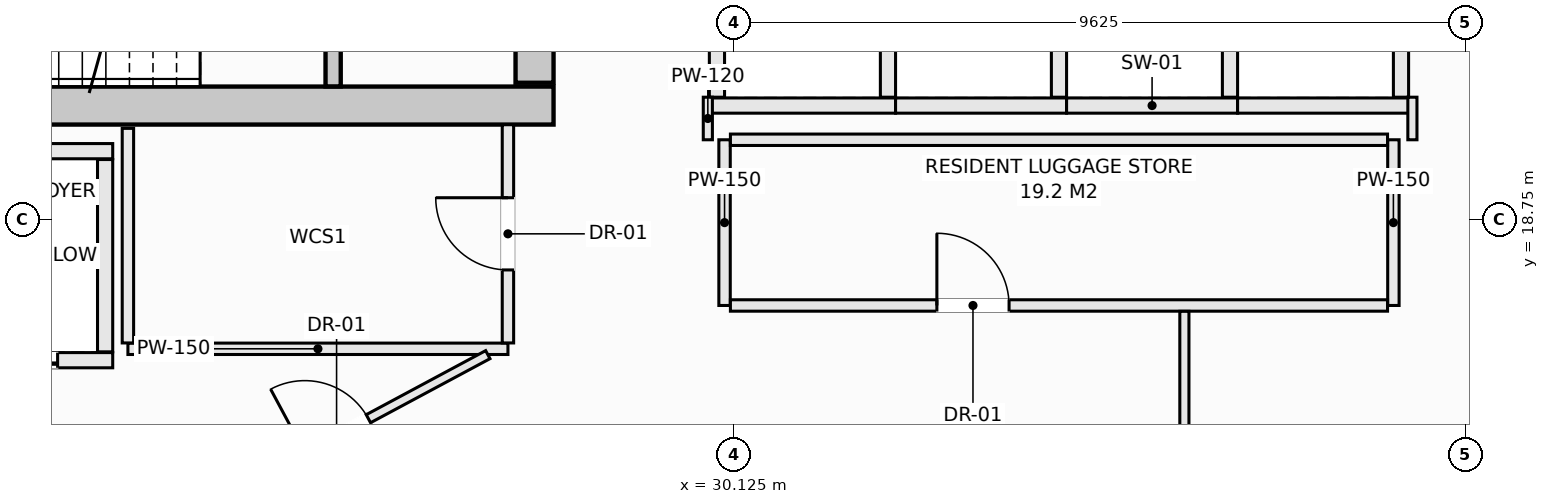
"""IFC4 building model, lengths in metres.
Left out: names, types, materials, properties, quantities, classifications, styles, units other than length and angle.
Written with IfcOpenShell. Run it as: python <this file> out.ifc"""

import sys

from ifc_helpers import new_model, si_unit, direction, frame, frame_2d, origin, place, context, subcontext, project, spatial, rectangle, extrude, element, fill, save


model = new_model("IFC4")
c1 = context("Model", 3, precision=1e-05, world=origin(), true_north=direction((0.0, 1.0)))
c2 = subcontext(c1, "Body", "Model", "MODEL_VIEW")
j1 = project(units=[si_unit("LENGTHUNIT", "METRE"), si_unit("PLANEANGLEUNIT", "RADIAN")], contexts=[c1])
p1 = place(None, origin())
s1 = spatial("IfcSite", under=j1, at=p1, CompositionType="ELEMENT")
p2 = place(p1, origin())
s2 = spatial("IfcBuilding", under=s1, at=p2, CompositionType="ELEMENT")
p3 = place(p2, frame((0.0, 0.0, 269.0)))
s3 = spatial("IfcBuildingStorey", under=s2, at=p3, CompositionType="ELEMENT", Elevation=269.0)
p4 = place(p3, frame((14.25, 20.25, -0.27), z_axis=(0.0, 0.0, 1.0), x_axis=(1.0, 0.0, 0.0)))
e1 = element("IfcWall", 1, at=p4, inside=s3, PredefinedType="SHEAR", context=c2, shape_type="SweptSolid", body=[
    extrude(rectangle(XDim=13.5, YDim=0.5, at=frame_2d((6.75, 0.0))), origin(), (0.0, 0.0, 1.0), 3.3),
])
p5 = place(p3, frame((27.5, 20.55, -0.27), z_axis=(0.0, 0.0, 1.0), x_axis=(0.0, 1.0, 0.0)))
e2 = element("IfcWall", 2, at=p5, inside=s3, PredefinedType="SHEAR", context=c2, shape_type="SweptSolid", body=[
    extrude(rectangle(XDim=1.5, YDim=0.5, at=frame_2d((0.75, 0.0))), origin(), (0.0, 0.0, 1.0), 3.3),
])
p6 = place(p3, frame((24.85, 20.502, -0.27), z_axis=(0.0, 0.0, 1.0), x_axis=(0.0, 1.0, 0.0)))
e3 = element("IfcWall", 3, at=p6, inside=s3, PredefinedType="SHEAR", context=c2, shape_type="SweptSolid", body=[
    extrude(rectangle(XDim=3.038, YDim=0.2, at=frame_2d((1.519, 0.0))), origin(), (0.0, 0.0, 1.0), 3.3),
])
p7 = place(p6, frame((0.969, 0.0, 0.27)))
e4 = element("IfcOpeningElement", 4, at=p7, cuts=e3, PredefinedType="OPENING", context=c2, shape_type="SweptSolid", body=[
    extrude(rectangle(XDim=1.1, YDim=2.15, at=frame_2d((0.55, 1.075))), frame((0.0, 0.11, 0.0), z_axis=(0.0, -1.0, 0.0), x_axis=(1.0, 0.0, 0.0)), (0.0, 0.0, 1.0), 0.22),
])
p8 = place(p3, frame((19.4, 19.65, 0.0), z_axis=(0.0, 0.0, 1.0), x_axis=(1.0, 0.0, 0.0)))
e5 = element("IfcWall", 5, at=p8, inside=s3, PredefinedType="SOLIDWALL", context=c2, shape_type="SweptSolid", body=[
    extrude(rectangle(XDim=2.55, YDim=0.2, at=frame_2d((1.275, 0.0))), origin(), (0.0, 0.0, 1.0), 3.03),
])
p9 = place(p3, frame((19.4, 16.9, 0.0), z_axis=(0.0, 0.0, 1.0), x_axis=(1.0, 0.0, 0.0)))
e6 = element("IfcWall", 6, at=p9, inside=s3, PredefinedType="SOLIDWALL", context=c2, shape_type="SweptSolid", body=[
    extrude(rectangle(XDim=2.55, YDim=0.2, at=frame_2d((1.275, 0.0))), origin(), (0.0, 0.0, 1.0), 3.03),
])
p10 = place(p9, frame((0.725, 0.0, 0.0)))
e7 = element("IfcOpeningElement", 7, at=p10, cuts=e6, PredefinedType="OPENING", context=c2, shape_type="SweptSolid", body=[
    extrude(rectangle(XDim=1.1, YDim=2.2, at=frame_2d((0.55, 1.1))), frame((0.0, 0.11, 0.0), z_axis=(0.0, -1.0, 0.0), x_axis=(1.0, 0.0, 0.0)), (0.0, 0.0, 1.0), 0.22),
])
p11 = place(p3, frame((21.85, 17.01, 0.0), z_axis=(0.0, 0.0, 1.0), x_axis=(0.0, 1.0, 0.0)))
e8 = element("IfcWall", 8, at=p11, inside=s3, PredefinedType="SOLIDWALL", context=c2, shape_type="SweptSolid", body=[
    extrude(rectangle(XDim=2.53, YDim=0.2, at=frame_2d((1.265, 0.0))), origin(), (0.0, 0.0, 1.0), 3.03),
])
p12 = place(p3, frame((29.8, 20.25, 0.0), z_axis=(0.0, 0.0, 1.0), x_axis=(1.0, 0.0, 0.0)))
e9 = element("IfcWall", 9, at=p12, inside=s3, PredefinedType="SOLIDWALL", context=c2, shape_type="SweptSolid", body=[
    extrude(rectangle(XDim=2.45, YDim=0.2, at=frame_2d((1.225, 0.0))), origin(), (0.0, 0.0, 1.0), 3.03),
])
for number, where, z_axis, x_axis in (
    (10, (29.9, 20.36, 0.0), (0.0, 0.0, 1.0), (0.0, 1.0, 0.0)),
    (11, (32.15, 20.36, 0.0), (0.0, 0.0, 1.0), (0.0, 1.0, 0.0)),
):
    element("IfcWall", number, at=place(p3, frame(where, z_axis=z_axis, x_axis=x_axis)), inside=s3, PredefinedType="SOLIDWALL", context=c2, shape_type="SweptSolid", body=[
        extrude(rectangle(XDim=2.43, YDim=0.2, at=frame_2d((1.215, 0.0))), origin(), (0.0, 0.0, 1.0), 3.03),
    ])
p13 = place(p3, frame((32.25, 20.25, 0.0), z_axis=(0.0, 0.0, 1.0), x_axis=(1.0, 0.0, 0.0)))
e12 = element("IfcWall", 12, at=p13, inside=s3, PredefinedType="SOLIDWALL", context=c2, shape_type="SweptSolid", body=[
    extrude(rectangle(XDim=2.25, YDim=0.2, at=frame_2d((1.125, 0.0))), origin(), (0.0, 0.0, 1.0), 3.03),
])
p14 = place(p3, frame((34.4, 20.36, 0.0), z_axis=(0.0, 0.0, 1.0), x_axis=(0.0, 1.0, 0.0)))
e13 = element("IfcWall", 13, at=p14, inside=s3, PredefinedType="SOLIDWALL", context=c2, shape_type="SweptSolid", body=[
    extrude(rectangle(XDim=2.43, YDim=0.2, at=frame_2d((1.215, 0.0))), origin(), (0.0, 0.0, 1.0), 3.03),
])
p15 = place(p3, frame((34.5, 20.25, 0.0), z_axis=(0.0, 0.0, 1.0), x_axis=(1.0, 0.0, 0.0)))
e14 = element("IfcWall", 14, at=p15, inside=s3, PredefinedType="SOLIDWALL", context=c2, shape_type="SweptSolid", body=[
    extrude(rectangle(XDim=2.25, YDim=0.2, at=frame_2d((1.125, 0.0))), origin(), (0.0, 0.0, 1.0), 3.03),
])
p16 = place(p3, frame((36.65, 20.36, 0.0), z_axis=(0.0, 0.0, 1.0), x_axis=(0.0, 1.0, 0.0)))
e15 = element("IfcWall", 15, at=p16, inside=s3, PredefinedType="SOLIDWALL", context=c2, shape_type="SweptSolid", body=[
    extrude(rectangle(XDim=2.43, YDim=0.2, at=frame_2d((1.215, 0.0))), origin(), (0.0, 0.0, 1.0), 3.03),
])
p17 = place(p3, frame((36.75, 20.25, 0.0), z_axis=(0.0, 0.0, 1.0), x_axis=(1.0, 0.0, 0.0)))
e16 = element("IfcWall", 16, at=p17, inside=s3, PredefinedType="SOLIDWALL", context=c2, shape_type="SweptSolid", body=[
    extrude(rectangle(XDim=2.25, YDim=0.2, at=frame_2d((1.125, 0.0))), origin(), (0.0, 0.0, 1.0), 3.03),
])
p18 = place(p3, frame((38.9, 20.36, 0.0), z_axis=(0.0, 0.0, 1.0), x_axis=(0.0, 1.0, 0.0)))
e17 = element("IfcWall", 17, at=p18, inside=s3, PredefinedType="SOLIDWALL", context=c2, shape_type="SweptSolid", body=[
    extrude(rectangle(XDim=2.43, YDim=0.2, at=frame_2d((1.215, 0.0))), origin(), (0.0, 0.0, 1.0), 3.03),
])
p19 = place(p3, frame((22.15, 17.05, 0.0), z_axis=(0.0, 0.0, 1.0), x_axis=(1.0, 0.0, 0.0)))
e18 = element("IfcWall", 18, at=p19, inside=s3, PredefinedType="PARTITIONING", context=c2, shape_type="SweptSolid", body=[
    extrude(rectangle(XDim=5.0, YDim=0.15, at=frame_2d((2.5, 0.0))), origin(), (0.0, 0.0, 1.0), 3.03),
])
p20 = place(p3, frame((22.15, 17.127, 0.0), z_axis=(0.0, 0.0, 1.0), x_axis=(0.0, 1.0, 0.0)))
e19 = element("IfcWall", 19, at=p20, inside=s3, PredefinedType="PARTITIONING", context=c2, shape_type="SweptSolid", body=[
    extrude(rectangle(XDim=2.823, YDim=0.15, at=frame_2d((1.412, 0.0))), origin(), (0.0, 0.0, 1.0), 3.03),
])
p21 = place(p3, frame((27.15, 17.127, 0.0), z_axis=(0.0, 0.0, 1.0), x_axis=(0.0, 1.0, 0.0)))
e20 = element("IfcWall", 20, at=p21, inside=s3, PredefinedType="PARTITIONING", context=c2, shape_type="SweptSolid", body=[
    extrude(rectangle(XDim=2.871, YDim=0.15, at=frame_2d((1.436, 0.0))), origin(), (0.0, 0.0, 1.0), 3.03),
])
p22 = place(p21, frame((0.96, 0.0, 0.0)))
e21 = element("IfcOpeningElement", 21, at=p22, cuts=e20, PredefinedType="OPENING", context=c2, shape_type="SweptSolid", body=[
    extrude(rectangle(XDim=0.95, YDim=2.1, at=frame_2d((0.475, 1.05))), frame((0.0, 0.085, 0.0), z_axis=(0.0, -1.0, 0.0), x_axis=(1.0, 0.0, 0.0)), (0.0, 0.0, 1.0), 0.17),
])
for number, where, z_axis, x_axis in (
    (22, (30.0, 17.62, 0.0), (0.0, 0.0, 1.0), (0.0, 1.0, 0.0)),
    (23, (38.8, 17.62, 0.0), (0.0, 0.0, 1.0), (0.0, 1.0, 0.0)),
):
    element("IfcWall", number, at=place(p3, frame(where, z_axis=z_axis, x_axis=x_axis)), inside=s3, PredefinedType="PARTITIONING", context=c2, shape_type="SweptSolid", body=[
        extrude(rectangle(XDim=2.18, YDim=0.15, at=frame_2d((1.09, 0.0))), origin(), (0.0, 0.0, 1.0), 3.03),
    ])
p23 = place(p3, frame((30.077, 17.62, 0.0), z_axis=(0.0, 0.0, 1.0), x_axis=(1.0, 0.0, 0.0)))
e24 = element("IfcWall", 24, at=p23, inside=s3, PredefinedType="PARTITIONING", context=c2, shape_type="SweptSolid", body=[
    extrude(rectangle(XDim=8.646, YDim=0.15, at=frame_2d((4.323, 0.0))), origin(), (0.0, 0.0, 1.0), 3.03),
])
p24 = place(p23, frame((2.717, 0.0, 0.0)))
e25 = element("IfcOpeningElement", 25, at=p24, cuts=e24, PredefinedType="OPENING", context=c2, shape_type="SweptSolid", body=[
    extrude(rectangle(XDim=0.95, YDim=2.1, at=frame_2d((0.475, 1.05))), frame((0.0, 0.085, 0.0), z_axis=(0.0, -1.0, 0.0), x_axis=(1.0, 0.0, 0.0)), (0.0, 0.0, 1.0), 0.17),
])
p25 = place(p3, frame((30.077, 19.8, 0.0), z_axis=(0.0, 0.0, 1.0), x_axis=(1.0, 0.0, 0.0)))
e26 = element("IfcWall", 26, at=p25, inside=s3, PredefinedType="PARTITIONING", context=c2, shape_type="SweptSolid", body=[
    extrude(rectangle(XDim=8.646, YDim=0.15, at=frame_2d((4.323, 0.0))), origin(), (0.0, 0.0, 1.0), 3.03),
])
for number, where, z_axis, x_axis in (
    (27, (39.05, 19.8, 0.0), (0.0, 0.0, 1.0), (0.0, 1.0, 0.0)),
    (28, (29.78, 19.8, 0.0), (0.0, 0.0, 1.0), (0.0, 1.0, 0.0)),
):
    element("IfcWall", number, at=place(p3, frame(where, z_axis=z_axis, x_axis=x_axis)), inside=s3, PredefinedType="PARTITIONING", context=c2, shape_type="SweptSolid", body=[
        extrude(rectangle(XDim=0.56, YDim=0.12, at=frame_2d((0.28, 0.0))), origin(), (0.0, 0.0, 1.0), 3.03),
    ])
p26 = place(p3, frame((36.05, 14.95, 0.0), z_axis=(0.0, 0.0, 1.0), x_axis=(0.0, 1.0, 0.0)))
e29 = element("IfcWall", 29, at=p26, inside=s3, PredefinedType="PARTITIONING", context=c2, shape_type="SweptSolid", body=[
    extrude(rectangle(XDim=2.593, YDim=0.12, at=frame_2d((1.296, 0.0))), origin(), (0.0, 0.0, 1.0), 3.03),
])
p27 = place(p3, frame((23.152, 14.971, 0.0), z_axis=(0.0, 0.0, 1.0), x_axis=(0.881315415599, 0.472528452295, 0.0)))
e30 = element("IfcWall", 30, at=p27, inside=s3, PredefinedType="PARTITIONING", context=c2, shape_type="SweptSolid", body=[
    extrude(rectangle(XDim=4.236, YDim=0.12, at=frame_2d((2.118, 0.0))), origin(), (0.0, 0.0, 1.0), 2.478),
])
p28 = place(p27, frame((1.503, 0.0, 0.0)))
e31 = element("IfcOpeningElement", 31, at=p28, cuts=e30, PredefinedType="OPENING", context=c2, shape_type="SweptSolid", body=[
    extrude(rectangle(XDim=0.95, YDim=2.1, at=frame_2d((0.475, 1.05))), frame((0.0, 0.07, 0.0), z_axis=(0.0, -1.0, 0.0), x_axis=(1.0, 0.0, 0.0)), (0.0, 0.0, 1.0), 0.14),
])
p29 = place(p10, origin())
e32 = element("IfcDoor", 32, at=p29, inside=s3, OperationType="SLIDING_TO_LEFT", PredefinedType="DOOR", context=c2, shape_type="SweptSolid", body=[
    extrude(rectangle(XDim=1.1, YDim=2.2, at=frame_2d((0.55, 1.1))), frame((0.0, 0.025, 0.0), z_axis=(0.0, -1.0, 0.0), x_axis=(1.0, 0.0, 0.0)), (0.0, 0.0, 1.0), 0.05),
])
fill(e7, e32)
p30 = place(p22, origin())
e33 = element("IfcDoor", 33, at=p30, inside=s3, OperationType="SINGLE_SWING_RIGHT", PredefinedType="DOOR", context=c2, shape_type="SweptSolid", body=[
    extrude(rectangle(XDim=0.95, YDim=2.1, at=frame_2d((0.475, 1.05))), frame((0.0, 0.025, 0.0), z_axis=(0.0, -1.0, 0.0), x_axis=(1.0, 0.0, 0.0)), (0.0, 0.0, 1.0), 0.05),
])
fill(e21, e33)
p31 = place(p24, origin())
e34 = element("IfcDoor", 34, at=p31, inside=s3, OperationType="SINGLE_SWING_LEFT", PredefinedType="DOOR", context=c2, shape_type="SweptSolid", body=[
    extrude(rectangle(XDim=0.95, YDim=2.1, at=frame_2d((0.475, 1.05))), frame((0.0, 0.025, 0.0), z_axis=(0.0, -1.0, 0.0), x_axis=(1.0, 0.0, 0.0)), (0.0, 0.0, 1.0), 0.05),
])
fill(e25, e34)
p32 = place(p28, origin())
e35 = element("IfcDoor", 35, at=p32, inside=s3, OperationType="SINGLE_SWING_LEFT", PredefinedType="DOOR", context=c2, shape_type="SweptSolid", body=[
    extrude(rectangle(XDim=0.95, YDim=2.1, at=frame_2d((0.475, 1.05))), frame((0.0, 0.025, 0.0), z_axis=(0.0, -1.0, 0.0), x_axis=(1.0, 0.0, 0.0)), (0.0, 0.0, 1.0), 0.05),
])
fill(e31, e35)
save(model, sys.argv[1])
